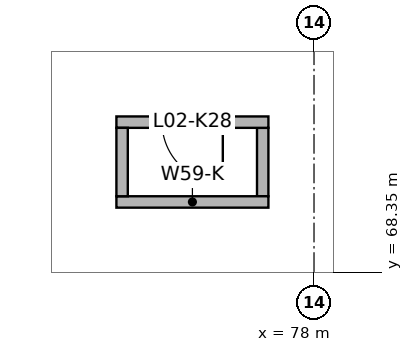
"""IFC4 building model, lengths in metres.
Left out: names, types, materials, properties, quantities, classifications, styles, units other than length and angle.
Written with IfcOpenShell. Run it as: python <this file> out.ifc"""

import sys

from ifc_helpers import new_model, si_unit, direction, frame, frame_2d, origin, place, context, subcontext, project, spatial, rectangle, extrude, element, fill, save


model = new_model("IFC4")
c1 = context("Model", 3, precision=1e-05, world=origin(), true_north=direction((0.0, 1.0)))
c2 = subcontext(c1, "Body", "Model", "MODEL_VIEW")
j1 = project(units=[si_unit("LENGTHUNIT", "METRE"), si_unit("PLANEANGLEUNIT", "RADIAN")], contexts=[c1])
p1 = place(None, origin())
s1 = spatial("IfcSite", under=j1, at=p1, CompositionType="ELEMENT")
p2 = place(p1, origin())
s2 = spatial("IfcBuilding", under=s1, at=p2, CompositionType="ELEMENT")
p3 = place(p2, frame((0.0, 0.0, 8.4)))
s3 = spatial("IfcBuildingStorey", under=s2, at=p3, CompositionType="ELEMENT", Elevation=8.4)
p4 = place(p3, frame((78.2, 65.2, 0.0), z_axis=(0.0, 0.0, 1.0), x_axis=(0.0, 1.0, 0.0)))
e1 = element("IfcWall", 1, at=p4, inside=s3, PredefinedType="SHEAR", context=c2, shape_type="SweptSolid", body=[
    extrude(rectangle(XDim=6.4, YDim=0.4, at=frame_2d((3.2, 0.0))), origin(), (0.0, 0.0, 1.0), 4.0),
])
p5 = place(p3, frame((75.0, 68.2, 0.0), z_axis=(0.0, 0.0, 1.0), x_axis=(1.0, 0.0, 0.0)))
e2 = element("IfcWall", 2, at=p5, inside=s3, PredefinedType="SHEAR", context=c2, shape_type="SweptSolid", body=[
    extrude(rectangle(XDim=3.0, YDim=0.4, at=frame_2d((1.5, 0.0))), origin(), (0.0, 0.0, 1.0), 4.2),
])
p6 = place(p3, frame((75.4, 69.275, 0.0), z_axis=(0.0, 0.0, 1.0), x_axis=(1.0, 0.0, 0.0)))
e3 = element("IfcWall", 3, at=p6, inside=s3, PredefinedType="SOLIDWALL", context=c2, shape_type="SweptSolid", body=[
    extrude(rectangle(XDim=2.0, YDim=0.15, at=frame_2d((1.0, 0.0))), origin(), (0.0, 0.0, 1.0), 4.2),
])
p7 = place(p3, frame((75.4, 70.325, 0.0), z_axis=(0.0, 0.0, 1.0), x_axis=(1.0, 0.0, 0.0)))
e4 = element("IfcWall", 4, at=p7, inside=s3, PredefinedType="SOLIDWALL", context=c2, shape_type="SweptSolid", body=[
    extrude(rectangle(XDim=2.0, YDim=0.15, at=frame_2d((1.0, 0.0))), origin(), (0.0, 0.0, 1.0), 4.2),
])
p8 = place(p7, frame((0.6, 0.0, 0.0)))
e5 = element("IfcOpeningElement", 5, at=p8, cuts=e4, PredefinedType="OPENING", context=c2, shape_type="SweptSolid", body=[
    extrude(rectangle(XDim=0.8, YDim=2.1, at=frame_2d((0.4, 1.05))), frame((0.0, 0.085, 0.0), z_axis=(0.0, -1.0, 0.0), x_axis=(1.0, 0.0, 0.0)), (0.0, 0.0, 1.0), 0.17),
])
for number, where, z_axis, x_axis in (
    (6, (75.475, 69.35, 0.0), (0.0, 0.0, 1.0), (0.0, 1.0, 0.0)),
    (7, (77.325, 69.35, 0.0), (0.0, 0.0, 1.0), (0.0, 1.0, 0.0)),
):
    element("IfcWall", number, at=place(p3, frame(where, z_axis=z_axis, x_axis=x_axis)), inside=s3, PredefinedType="SOLIDWALL", context=c2, shape_type="SweptSolid", body=[
        extrude(rectangle(XDim=0.9, YDim=0.15, at=frame_2d((0.45, 0.0))), origin(), (0.0, 0.0, 1.0), 4.2),
    ])
p9 = place(p3, frame((75.55, 69.275, -0.25), z_axis=(0.0, 0.0, 1.0), x_axis=(1.0, 0.0, 0.0)))
e8 = element("IfcWall", 8, at=p9, inside=s3, PredefinedType="SOLIDWALL", context=c2, shape_type="SweptSolid", body=[
    extrude(rectangle(XDim=1.7, YDim=0.15, at=frame_2d((0.85, 0.0))), origin(), (0.0, 0.0, 1.0), 0.25),
])
p10 = place(p3, frame((75.4, 70.325, -0.25), z_axis=(0.0, 0.0, 1.0), x_axis=(1.0, 0.0, 0.0)))
e9 = element("IfcWall", 9, at=p10, inside=s3, PredefinedType="SOLIDWALL", context=c2, shape_type="SweptSolid", body=[
    extrude(rectangle(XDim=2.0, YDim=0.15, at=frame_2d((1.0, 0.0))), origin(), (0.0, 0.0, 1.0), 0.25),
])
for number, where, z_axis, x_axis in (
    (10, (75.475, 69.2, -0.25), (0.0, 0.0, 1.0), (0.0, 1.0, 0.0)),
    (11, (77.325, 69.2, -0.25), (0.0, 0.0, 1.0), (0.0, 1.0, 0.0)),
):
    element("IfcWall", number, at=place(p3, frame(where, z_axis=z_axis, x_axis=x_axis)), inside=s3, PredefinedType="SOLIDWALL", context=c2, shape_type="SweptSolid", body=[
        extrude(rectangle(XDim=1.05, YDim=0.15, at=frame_2d((0.525, 0.0))), origin(), (0.0, 0.0, 1.0), 0.25),
    ])
p11 = place(p8, frame((0.8, 0.0, 0.0), z_axis=(0.0, 0.0, 1.0), x_axis=(-1.0, 0.0, 0.0)))
e12 = element("IfcDoor", 12, at=p11, inside=s3, OperationType="SINGLE_SWING_LEFT", PredefinedType="DOOR", context=c2, shape_type="SweptSolid", body=[
    extrude(rectangle(XDim=0.8, YDim=2.1, at=frame_2d((0.4, 1.05))), frame((0.0, 0.025, 0.0), z_axis=(0.0, -1.0, 0.0), x_axis=(1.0, 0.0, 0.0)), (0.0, 0.0, 1.0), 0.05),
])
fill(e5, e12)
save(model, sys.argv[1])
